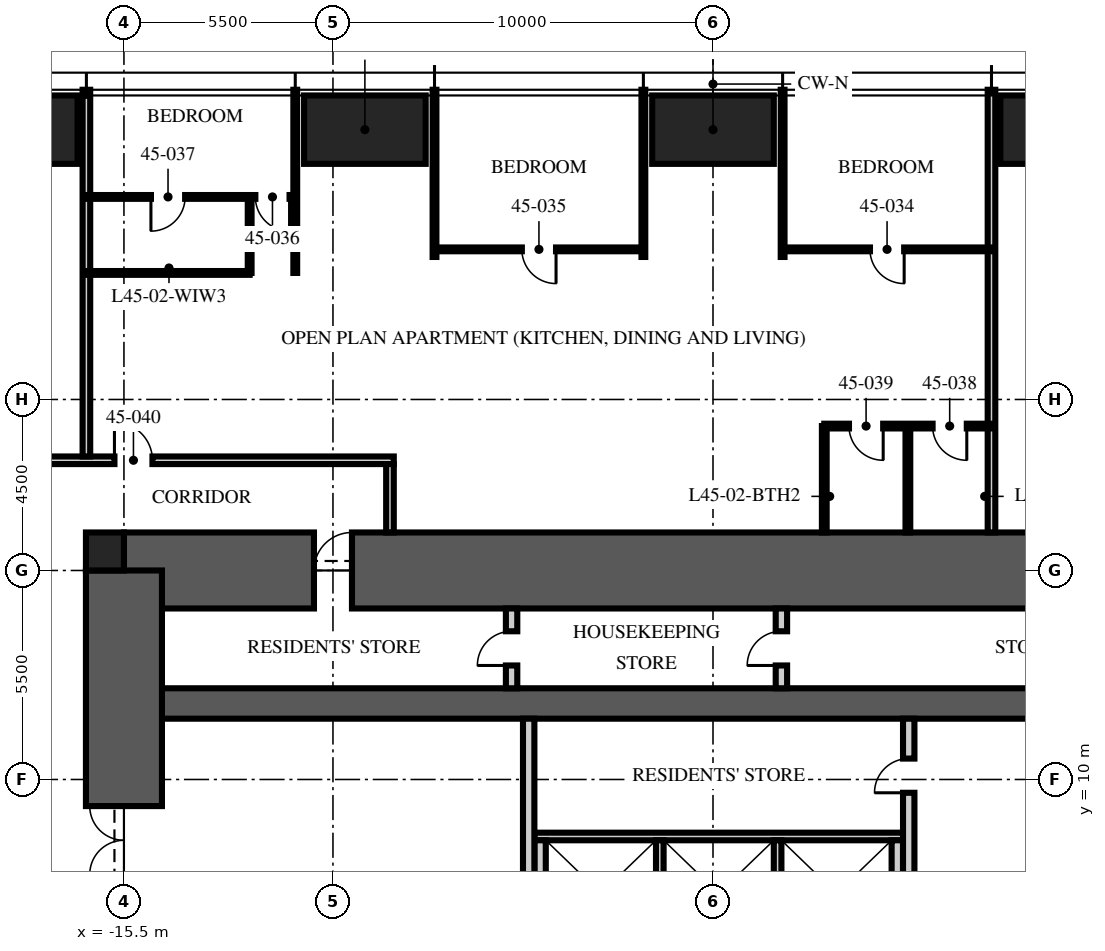
"""IFC4 building model, lengths in metres.
Left out: names, types, materials, properties, quantities, classifications, styles, units other than length and angle.
Written with IfcOpenShell. Run it as: python <this file> out.ifc"""

import sys

from ifc_helpers import new_model, si_unit, direction, frame, frame_2d, origin, origin_2d, place, context, subcontext, project, spatial, rectangle, hollow_rectangle, extrude, element, fill, save


model = new_model("IFC4")
c1 = context("Model", 3, precision=1e-05, world=origin(), true_north=direction((0.0, 1.0)))
c2 = subcontext(c1, "Body", "Model", "MODEL_VIEW")
j1 = project(units=[si_unit("LENGTHUNIT", "METRE"), si_unit("PLANEANGLEUNIT", "RADIAN")], contexts=[c1])
p1 = place(None, origin())
s1 = spatial("IfcSite", under=j1, at=p1, CompositionType="ELEMENT")
p2 = place(p1, origin())
s2 = spatial("IfcBuilding", under=s1, at=p2, CompositionType="ELEMENT")
p3 = place(p2, frame((0.0, 0.0, 178.5)))
s3 = spatial("IfcBuildingStorey", under=s2, at=p3, CompositionType="ELEMENT", Elevation=178.5)
p4 = place(p3, frame((-15.5, 15.5, -0.25), z_axis=(0.0, 0.0, 1.0), x_axis=(1.0, 0.0, 0.0)))
e1 = element("IfcWall", 1, at=p4, inside=s3, PredefinedType="SHEAR", context=c2, shape_type="SweptSolid", body=[
    extrude(rectangle(XDim=31.0, YDim=2.0, at=frame_2d((15.5, 0.0))), origin(), (0.0, 0.0, 1.0), 3.75),
])
p5 = place(p4, frame((5.0, 0.0, 0.25)))
e2 = element("IfcOpeningElement", 2, at=p5, cuts=e1, PredefinedType="OPENING", context=c2, shape_type="SweptSolid", body=[
    extrude(rectangle(XDim=1.0, YDim=2.1, at=frame_2d((0.5, 1.05))), frame((0.0, 1.01, 0.0), z_axis=(0.0, -1.0, 0.0), x_axis=(1.0, 0.0, 0.0)), (0.0, 0.0, 1.0), 2.02),
])
p6 = place(p3, frame((-15.5, 12.0, -0.25), z_axis=(0.0, 0.0, 1.0), x_axis=(1.0, 0.0, 0.0)))
e3 = element("IfcWall", 3, at=p6, inside=s3, PredefinedType="SHEAR", context=c2, shape_type="SweptSolid", body=[
    extrude(rectangle(XDim=31.0, YDim=0.8, at=frame_2d((15.5, 0.0))), origin(), (0.0, 0.0, 1.0), 3.75),
])
p7 = place(p3, frame((-15.5, -15.5, -0.25), z_axis=(0.0, 0.0, 1.0), x_axis=(0.0, 1.0, 0.0)))
e4 = element("IfcWall", 4, at=p7, inside=s3, PredefinedType="SHEAR", context=c2, shape_type="SweptSolid", body=[
    extrude(rectangle(XDim=31.0, YDim=2.0, at=frame_2d((15.5, 0.0))), origin(), (0.0, 0.0, 1.0), 3.75),
])
p8 = place(p7, frame((6.5, 0.0, 0.25)))
e5 = element("IfcOpeningElement", 5, at=p8, cuts=e4, PredefinedType="OPENING", context=c2, shape_type="SweptSolid", body=[
    extrude(rectangle(XDim=1.2, YDim=2.1, at=frame_2d((0.6, 1.05))), frame((0.0, 1.01, 0.0), z_axis=(0.0, -1.0, 0.0), x_axis=(1.0, 0.0, 0.0)), (0.0, 0.0, 1.0), 2.02),
])
p9 = place(p7, frame((23.0, 0.0, 0.25)))
e6 = element("IfcOpeningElement", 6, at=p9, cuts=e4, PredefinedType="OPENING", context=c2, shape_type="SweptSolid", body=[
    extrude(rectangle(XDim=1.8, YDim=2.1, at=frame_2d((0.9, 1.05))), frame((0.0, 1.01, 0.0), z_axis=(0.0, -1.0, 0.0), x_axis=(1.0, 0.0, 0.0)), (0.0, 0.0, 1.0), 2.02),
])
p10 = place(p3, frame((-16.0, 16.0, -0.25), z_axis=(0.0, 0.0, 1.0), x_axis=(1.0, 0.0, 0.0)))
e7 = element("IfcColumn", 7, at=p10, inside=s3, PredefinedType="COLUMN", context=c2, shape_type="SweptSolid", body=[
    extrude(rectangle(XDim=1.0, YDim=1.0, at=origin_2d()), origin(), (0.0, 0.0, 1.0), 3.75),
])
for number, where, z_axis, x_axis in (
    (8, (-18.32, 27.1, 0.0), (0.0, 0.0, 1.0), (1.0, 0.0, 0.0)),
    (9, (-9.16, 27.1, 0.0), (0.0, 0.0, 1.0), (1.0, 0.0, 0.0)),
    (10, (0.0, 27.1, 0.0), (0.0, 0.0, 1.0), (1.0, 0.0, 0.0)),
    (11, (9.16, 27.1, 0.0), (0.0, 0.0, 1.0), (1.0, 0.0, 0.0)),
):
    element("IfcColumn", number, at=place(p3, frame(where, z_axis=z_axis, x_axis=x_axis)), inside=s3, PredefinedType="COLUMN", context=c2, shape_type="SweptSolid", body=[
        extrude(hollow_rectangle(XDim=3.2, YDim=1.8, WallThickness=0.2, at=origin_2d()), origin(), (0.0, 0.0, 1.0), 3.75),
    ])
p11 = place(p3, frame((-4.7, 8.5, 0.0), z_axis=(0.0, 0.0, 1.0), x_axis=(1.0, 0.0, 0.0)))
e12 = element("IfcWall", 12, at=p11, inside=s3, PredefinedType="PARTITIONING", context=c2, shape_type="SweptSolid", body=[
    extrude(rectangle(XDim=9.7, YDim=0.2, at=frame_2d((4.85, 0.0))), origin(), (0.0, 0.0, 1.0), 3.5),
])
for number, where, z_axis, x_axis in (
    (13, (-4.55, 5.6, 0.0), (0.0, 0.0, 1.0), (0.0, 1.0, 0.0)),
    (14, (4.85, 5.6, 0.0), (0.0, 0.0, 1.0), (0.0, 1.0, 0.0)),
):
    element("IfcWall", number, at=place(p3, frame(where, z_axis=z_axis, x_axis=x_axis)), inside=s3, PredefinedType="PARTITIONING", context=c2, shape_type="SweptSolid", body=[
        extrude(rectangle(XDim=2.8, YDim=0.3, at=frame_2d((1.4, 0.0))), origin(), (0.0, 0.0, 1.0), 3.5),
    ])
for number, where, z_axis, x_axis in (
    (15, (-1.4, 5.6, 0.0), (0.0, 0.0, 1.0), (0.0, 1.0, 0.0)),
    (16, (1.7, 5.6, 0.0), (0.0, 0.0, 1.0), (0.0, 1.0, 0.0)),
):
    element("IfcWall", number, at=place(p3, frame(where, z_axis=z_axis, x_axis=x_axis)), inside=s3, PredefinedType="PARTITIONING", context=c2, shape_type="SweptSolid", body=[
        extrude(rectangle(XDim=2.8, YDim=0.2, at=frame_2d((1.4, 0.0))), origin(), (0.0, 0.0, 1.0), 3.5),
    ])
p12 = place(p3, frame((-4.85, 5.3, 0.0), z_axis=(0.0, 0.0, 1.0), x_axis=(0.0, 1.0, 0.0)))
e17 = element("IfcWall", 17, at=p12, inside=s3, PredefinedType="PARTITIONING", context=c2, shape_type="SweptSolid", body=[
    extrude(rectangle(XDim=6.3, YDim=0.3, at=frame_2d((3.15, 0.0))), origin(), (0.0, 0.0, 1.0), 3.5),
])
p13 = place(p3, frame((5.15, 5.3, 0.0), z_axis=(0.0, 0.0, 1.0), x_axis=(0.0, 1.0, 0.0)))
e18 = element("IfcWall", 18, at=p13, inside=s3, PredefinedType="PARTITIONING", context=c2, shape_type="SweptSolid", body=[
    extrude(rectangle(XDim=6.3, YDim=0.3, at=frame_2d((3.15, 0.0))), origin(), (0.0, 0.0, 1.0), 3.5),
])
p14 = place(p13, frame((4.35, 0.0, 0.0)))
e19 = element("IfcOpeningElement", 19, at=p14, cuts=e18, PredefinedType="OPENING", context=c2, shape_type="SweptSolid", body=[
    extrude(rectangle(XDim=0.9, YDim=2.1, at=frame_2d((0.45, 1.05))), frame((0.0, 0.16, 0.0), z_axis=(0.0, -1.0, 0.0), x_axis=(1.0, 0.0, 0.0)), (0.0, 0.0, 1.0), 0.32),
])
p15 = place(p3, frame((-5.3, 12.4, 0.0), z_axis=(0.0, 0.0, 1.0), x_axis=(0.0, 1.0, 0.0)))
e20 = element("IfcWall", 20, at=p15, inside=s3, PredefinedType="PARTITIONING", context=c2, shape_type="SweptSolid", body=[
    extrude(rectangle(XDim=2.1, YDim=0.3, at=frame_2d((1.05, 0.0))), origin(), (0.0, 0.0, 1.0), 3.5),
])
p16 = place(p15, frame((0.6, 0.0, 0.0)))
e21 = element("IfcOpeningElement", 21, at=p16, cuts=e20, PredefinedType="OPENING", context=c2, shape_type="SweptSolid", body=[
    extrude(rectangle(XDim=0.9, YDim=2.1, at=frame_2d((0.45, 1.05))), frame((0.0, 0.16, 0.0), z_axis=(0.0, -1.0, 0.0), x_axis=(1.0, 0.0, 0.0)), (0.0, 0.0, 1.0), 0.32),
])
p17 = place(p3, frame((1.8, 12.4, 0.0), z_axis=(0.0, 0.0, 1.0), x_axis=(0.0, 1.0, 0.0)))
e22 = element("IfcWall", 22, at=p17, inside=s3, PredefinedType="PARTITIONING", context=c2, shape_type="SweptSolid", body=[
    extrude(rectangle(XDim=2.1, YDim=0.3, at=frame_2d((1.05, 0.0))), origin(), (0.0, 0.0, 1.0), 3.5),
])
p18 = place(p17, frame((0.6, 0.0, 0.0)))
e23 = element("IfcOpeningElement", 23, at=p18, cuts=e22, PredefinedType="OPENING", context=c2, shape_type="SweptSolid", body=[
    extrude(rectangle(XDim=0.9, YDim=2.1, at=frame_2d((0.45, 1.05))), frame((0.0, 0.16, 0.0), z_axis=(0.0, -1.0, 0.0), x_axis=(1.0, 0.0, 0.0)), (0.0, 0.0, 1.0), 0.32),
])
p19 = place(p3, frame((-18.5, 18.4, 0.0), z_axis=(0.0, 0.0, 1.0), x_axis=(1.0, 0.0, 0.0)))
e24 = element("IfcWall", 24, at=p19, inside=s3, PredefinedType="PARTITIONING", context=c2, shape_type="SweptSolid", body=[
    extrude(rectangle(XDim=10.1, YDim=0.2, at=frame_2d((5.05, 0.0))), origin(), (0.0, 0.0, 1.0), 2.3),
])
p20 = place(p19, frame((2.75, 0.0, 0.0)))
e25 = element("IfcOpeningElement", 25, at=p20, cuts=e24, PredefinedType="OPENING", context=c2, shape_type="SweptSolid", body=[
    extrude(rectangle(XDim=1.0, YDim=2.2, at=frame_2d((0.5, 1.1))), frame((0.0, 0.11, 0.0), z_axis=(0.0, -1.0, 0.0), x_axis=(1.0, 0.0, 0.0)), (0.0, 0.0, 1.0), 0.22),
])
p21 = place(p3, frame((-8.5, 18.3, 0.0), z_axis=(0.0, 0.0, 1.0), x_axis=(0.0, -1.0, 0.0)))
e26 = element("IfcWall", 26, at=p21, inside=s3, PredefinedType="PARTITIONING", context=c2, shape_type="SweptSolid", body=[
    extrude(rectangle(XDim=1.8, YDim=0.2, at=frame_2d((0.9, 0.0))), origin(), (0.0, 0.0, 1.0), 3.5),
])
p22 = place(p3, frame((7.328, 16.5, 0.0), z_axis=(0.0, 0.0, 1.0), x_axis=(0.0, 1.0, 0.0)))
e27 = element("IfcWall", 27, at=p22, inside=s3, PredefinedType="PARTITIONING", context=c2, shape_type="SweptSolid", body=[
    extrude(rectangle(XDim=11.65, YDim=0.2, at=frame_2d((5.825, 0.0))), origin(), (0.0, 0.0, 1.0), 2.81),
])
for number, where, z_axis, x_axis in (
    (28, (1.832, 23.75, 0.0), (0.0, 0.0, 1.0), (0.0, 1.0, 0.0)),
    (29, (-1.832, 23.75, 0.0), (0.0, 0.0, 1.0), (0.0, 1.0, 0.0)),
    (30, (-7.328, 23.75, 0.0), (0.0, 0.0, 1.0), (0.0, 1.0, 0.0)),
):
    element("IfcWall", number, at=place(p3, frame(where, z_axis=z_axis, x_axis=x_axis)), inside=s3, PredefinedType="PARTITIONING", context=c2, shape_type="SweptSolid", body=[
        extrude(rectangle(XDim=4.4, YDim=0.1, at=frame_2d((2.2, 0.0))), origin(), (0.0, 0.0, 1.0), 2.81),
    ])
p23 = place(p3, frame((-10.992, 23.33, 0.0), z_axis=(0.0, 0.0, 1.0), x_axis=(0.0, 1.0, 0.0)))
e31 = element("IfcWall", 31, at=p23, inside=s3, PredefinedType="PARTITIONING", context=c2, shape_type="SweptSolid", body=[
    extrude(rectangle(XDim=4.82, YDim=0.1, at=frame_2d((2.41, 0.0))), origin(), (0.0, 0.0, 1.0), 2.81),
])
p24 = place(p3, frame((-16.488, 18.5, 0.0), z_axis=(0.0, 0.0, 1.0), x_axis=(0.0, 1.0, 0.0)))
e32 = element("IfcWall", 32, at=p24, inside=s3, PredefinedType="PARTITIONING", context=c2, shape_type="SweptSolid", body=[
    extrude(rectangle(XDim=9.65, YDim=0.2, at=frame_2d((4.825, 0.0))), origin(), (0.0, 0.0, 1.0), 2.81),
])
p25 = place(p3, frame((7.328, 23.95, 0.0), z_axis=(0.0, 0.0, 1.0), x_axis=(-1.0, 0.0, 0.0)))
e33 = element("IfcWall", 33, at=p25, inside=s3, PredefinedType="PARTITIONING", context=c2, shape_type="SweptSolid", body=[
    extrude(rectangle(XDim=5.496, YDim=0.1, at=frame_2d((2.748, 0.0))), origin(), (0.0, 0.0, 1.0), 2.81),
])
p26 = place(p25, frame((2.298, 0.0, 0.0)))
e34 = element("IfcOpeningElement", 34, at=p26, cuts=e33, PredefinedType="OPENING", context=c2, shape_type="SweptSolid", body=[
    extrude(rectangle(XDim=0.9, YDim=2.1, at=frame_2d((0.45, 1.05))), frame((0.0, 0.06, 0.0), z_axis=(0.0, -1.0, 0.0), x_axis=(1.0, 0.0, 0.0)), (0.0, 0.0, 1.0), 0.12),
])
p27 = place(p3, frame((-1.832, 23.95, 0.0), z_axis=(0.0, 0.0, 1.0), x_axis=(-1.0, 0.0, 0.0)))
e35 = element("IfcWall", 35, at=p27, inside=s3, PredefinedType="PARTITIONING", context=c2, shape_type="SweptSolid", body=[
    extrude(rectangle(XDim=5.496, YDim=0.1, at=frame_2d((2.748, 0.0))), origin(), (0.0, 0.0, 1.0), 2.81),
])
p28 = place(p27, frame((2.298, 0.0, 0.0)))
e36 = element("IfcOpeningElement", 36, at=p28, cuts=e35, PredefinedType="OPENING", context=c2, shape_type="SweptSolid", body=[
    extrude(rectangle(XDim=0.9, YDim=2.1, at=frame_2d((0.45, 1.05))), frame((0.0, 0.06, 0.0), z_axis=(0.0, -1.0, 0.0), x_axis=(1.0, 0.0, 0.0)), (0.0, 0.0, 1.0), 0.12),
])
p29 = place(p3, frame((-10.992, 25.33, 0.0), z_axis=(0.0, 0.0, 1.0), x_axis=(-1.0, 0.0, 0.0)))
e37 = element("IfcWall", 37, at=p29, inside=s3, PredefinedType="PARTITIONING", context=c2, shape_type="SweptSolid", body=[
    extrude(rectangle(XDim=5.496, YDim=0.1, at=frame_2d((2.748, 0.0))), origin(), (0.0, 0.0, 1.0), 2.81),
])
p30 = place(p29, frame((0.15, 0.0, 0.0)))
e38 = element("IfcOpeningElement", 38, at=p30, cuts=e37, PredefinedType="OPENING", context=c2, shape_type="SweptSolid", body=[
    extrude(rectangle(XDim=0.9, YDim=2.1, at=frame_2d((0.45, 1.05))), frame((0.0, 0.06, 0.0), z_axis=(0.0, -1.0, 0.0), x_axis=(1.0, 0.0, 0.0)), (0.0, 0.0, 1.0), 0.12),
])
p31 = place(p29, frame((2.898, 0.0, 0.0)))
e39 = element("IfcOpeningElement", 39, at=p31, cuts=e37, PredefinedType="OPENING", context=c2, shape_type="SweptSolid", body=[
    extrude(rectangle(XDim=0.9, YDim=2.1, at=frame_2d((0.45, 1.05))), frame((0.0, 0.06, 0.0), z_axis=(0.0, -1.0, 0.0), x_axis=(1.0, 0.0, 0.0)), (0.0, 0.0, 1.0), 0.12),
])
p32 = place(p3, frame((-12.192, 23.33, 0.0), z_axis=(0.0, 0.0, 1.0), x_axis=(0.0, 1.0, 0.0)))
e40 = element("IfcWall", 40, at=p32, inside=s3, PredefinedType="PARTITIONING", context=c2, shape_type="SweptSolid", body=[
    extrude(rectangle(XDim=2.0, YDim=0.1, at=frame_2d((1.0, 0.0))), origin(), (0.0, 0.0, 1.0), 3.5),
])
p33 = place(p3, frame((-12.192, 23.33, 0.0), z_axis=(0.0, 0.0, 1.0), x_axis=(-1.0, 0.0, 0.0)))
e41 = element("IfcWall", 41, at=p33, inside=s3, PredefinedType="PARTITIONING", context=c2, shape_type="SweptSolid", body=[
    extrude(rectangle(XDim=4.296, YDim=0.1, at=frame_2d((2.148, 0.0))), origin(), (0.0, 0.0, 1.0), 2.81),
])
p34 = place(p3, frame((7.328, 19.3, 0.0), z_axis=(0.0, 0.0, 1.0), x_axis=(-1.0, 0.0, 0.0)))
e42 = element("IfcWall", 42, at=p34, inside=s3, PredefinedType="PARTITIONING", context=c2, shape_type="SweptSolid", body=[
    extrude(rectangle(XDim=4.4, YDim=0.125, at=frame_2d((2.2, 0.0))), origin(), (0.0, 0.0, 1.0), 2.81),
])
p35 = place(p34, frame((0.65, 0.0, 0.0)))
e43 = element("IfcOpeningElement", 43, at=p35, cuts=e42, PredefinedType="OPENING", context=c2, shape_type="SweptSolid", body=[
    extrude(rectangle(XDim=0.9, YDim=2.1, at=frame_2d((0.45, 1.05))), frame((0.0, 0.073, 0.0), z_axis=(0.0, -1.0, 0.0), x_axis=(1.0, 0.0, 0.0)), (0.0, 0.0, 1.0), 0.145),
])
p36 = place(p34, frame((2.85, 0.0, 0.0)))
e44 = element("IfcOpeningElement", 44, at=p36, cuts=e42, PredefinedType="OPENING", context=c2, shape_type="SweptSolid", body=[
    extrude(rectangle(XDim=0.9, YDim=2.1, at=frame_2d((0.45, 1.05))), frame((0.0, 0.073, 0.0), z_axis=(0.0, -1.0, 0.0), x_axis=(1.0, 0.0, 0.0)), (0.0, 0.0, 1.0), 0.145),
])
for number, where, z_axis, x_axis in (
    (45, (5.128, 16.5, 0.0), (0.0, 0.0, 1.0), (0.0, 1.0, 0.0)),
    (46, (2.928, 16.5, 0.0), (0.0, 0.0, 1.0), (0.0, 1.0, 0.0)),
):
    element("IfcWall", number, at=place(p3, frame(where, z_axis=z_axis, x_axis=x_axis)), inside=s3, PredefinedType="PARTITIONING", context=c2, shape_type="SweptSolid", body=[
        extrude(rectangle(XDim=2.8, YDim=0.125, at=frame_2d((1.4, 0.0))), origin(), (0.0, 0.0, 1.0), 3.5),
    ])
p37 = place(p9, origin())
e47 = element("IfcDoor", 47, at=p37, inside=s3, OperationType="DOUBLE_DOOR_SINGLE_SWING", PredefinedType="DOOR", context=c2, shape_type="SweptSolid", body=[
    extrude(rectangle(XDim=1.8, YDim=2.1, at=frame_2d((0.9, 1.05))), frame((0.0, 0.025, 0.0), z_axis=(0.0, -1.0, 0.0), x_axis=(1.0, 0.0, 0.0)), (0.0, 0.0, 1.0), 0.05),
])
fill(e6, e47)
p38 = place(p14, origin())
e48 = element("IfcDoor", 48, at=p38, inside=s3, OperationType="SINGLE_SWING_LEFT", PredefinedType="DOOR", context=c2, shape_type="SweptSolid", body=[
    extrude(rectangle(XDim=0.9, YDim=2.1, at=frame_2d((0.45, 1.05))), frame((0.0, 0.025, 0.0), z_axis=(0.0, -1.0, 0.0), x_axis=(1.0, 0.0, 0.0)), (0.0, 0.0, 1.0), 0.05),
])
fill(e19, e48)
p39 = place(p16, origin())
e49 = element("IfcDoor", 49, at=p39, inside=s3, OperationType="SINGLE_SWING_LEFT", PredefinedType="DOOR", context=c2, shape_type="SweptSolid", body=[
    extrude(rectangle(XDim=0.9, YDim=2.1, at=frame_2d((0.45, 1.05))), frame((0.0, 0.025, 0.0), z_axis=(0.0, -1.0, 0.0), x_axis=(1.0, 0.0, 0.0)), (0.0, 0.0, 1.0), 0.05),
])
fill(e21, e49)
p40 = place(p18, origin())
e50 = element("IfcDoor", 50, at=p40, inside=s3, OperationType="SINGLE_SWING_LEFT", PredefinedType="DOOR", context=c2, shape_type="SweptSolid", body=[
    extrude(rectangle(XDim=0.9, YDim=2.1, at=frame_2d((0.45, 1.05))), frame((0.0, 0.025, 0.0), z_axis=(0.0, -1.0, 0.0), x_axis=(1.0, 0.0, 0.0)), (0.0, 0.0, 1.0), 0.05),
])
fill(e23, e50)
p41 = place(p5, origin())
e51 = element("IfcDoor", 51, at=p41, inside=s3, OperationType="SINGLE_SWING_RIGHT", PredefinedType="DOOR", context=c2, shape_type="SweptSolid", body=[
    extrude(rectangle(XDim=1.0, YDim=2.1, at=frame_2d((0.5, 1.05))), frame((0.0, 0.025, 0.0), z_axis=(0.0, -1.0, 0.0), x_axis=(1.0, 0.0, 0.0)), (0.0, 0.0, 1.0), 0.05),
])
fill(e2, e51)
p42 = place(p26, origin())
e52 = element("IfcDoor", 52, at=p42, inside=s3, OperationType="SINGLE_SWING_LEFT", PredefinedType="DOOR", context=c2, shape_type="SweptSolid", body=[
    extrude(rectangle(XDim=0.9, YDim=2.1, at=frame_2d((0.45, 1.05))), frame((0.0, 0.025, 0.0), z_axis=(0.0, -1.0, 0.0), x_axis=(1.0, 0.0, 0.0)), (0.0, 0.0, 1.0), 0.05),
])
fill(e34, e52)
p43 = place(p28, origin())
e53 = element("IfcDoor", 53, at=p43, inside=s3, OperationType="SINGLE_SWING_LEFT", PredefinedType="DOOR", context=c2, shape_type="SweptSolid", body=[
    extrude(rectangle(XDim=0.9, YDim=2.1, at=frame_2d((0.45, 1.05))), frame((0.0, 0.025, 0.0), z_axis=(0.0, -1.0, 0.0), x_axis=(1.0, 0.0, 0.0)), (0.0, 0.0, 1.0), 0.05),
])
fill(e36, e53)
p44 = place(p30, origin())
e54 = element("IfcDoor", 54, at=p44, inside=s3, OperationType="SINGLE_SWING_LEFT", PredefinedType="DOOR", context=c2, shape_type="SweptSolid", body=[
    extrude(rectangle(XDim=0.9, YDim=2.1, at=frame_2d((0.45, 1.05))), frame((0.0, 0.025, 0.0), z_axis=(0.0, -1.0, 0.0), x_axis=(1.0, 0.0, 0.0)), (0.0, 0.0, 1.0), 0.05),
])
fill(e38, e54)
p45 = place(p31, origin())
e55 = element("IfcDoor", 55, at=p45, inside=s3, OperationType="SINGLE_SWING_RIGHT", PredefinedType="DOOR", context=c2, shape_type="SweptSolid", body=[
    extrude(rectangle(XDim=0.9, YDim=2.1, at=frame_2d((0.45, 1.05))), frame((0.0, 0.025, 0.0), z_axis=(0.0, -1.0, 0.0), x_axis=(1.0, 0.0, 0.0)), (0.0, 0.0, 1.0), 0.05),
])
fill(e39, e55)
p46 = place(p35, origin())
e56 = element("IfcDoor", 56, at=p46, inside=s3, OperationType="SINGLE_SWING_LEFT", PredefinedType="DOOR", context=c2, shape_type="SweptSolid", body=[
    extrude(rectangle(XDim=0.9, YDim=2.1, at=frame_2d((0.45, 1.05))), frame((0.0, 0.025, 0.0), z_axis=(0.0, -1.0, 0.0), x_axis=(1.0, 0.0, 0.0)), (0.0, 0.0, 1.0), 0.05),
])
fill(e43, e56)
p47 = place(p36, origin())
e57 = element("IfcDoor", 57, at=p47, inside=s3, OperationType="SINGLE_SWING_LEFT", PredefinedType="DOOR", context=c2, shape_type="SweptSolid", body=[
    extrude(rectangle(XDim=0.9, YDim=2.1, at=frame_2d((0.45, 1.05))), frame((0.0, 0.025, 0.0), z_axis=(0.0, -1.0, 0.0), x_axis=(1.0, 0.0, 0.0)), (0.0, 0.0, 1.0), 0.05),
])
fill(e44, e57)
p48 = place(p20, origin())
e58 = element("IfcDoor", 58, at=p48, inside=s3, OperationType="SINGLE_SWING_LEFT", PredefinedType="DOOR", context=c2, shape_type="SweptSolid", body=[
    extrude(rectangle(XDim=1.0, YDim=2.2, at=frame_2d((0.5, 1.1))), frame((0.0, 0.025, 0.0), z_axis=(0.0, -1.0, 0.0), x_axis=(1.0, 0.0, 0.0)), (0.0, 0.0, 1.0), 0.05),
])
fill(e25, e58)
save(model, sys.argv[1])
